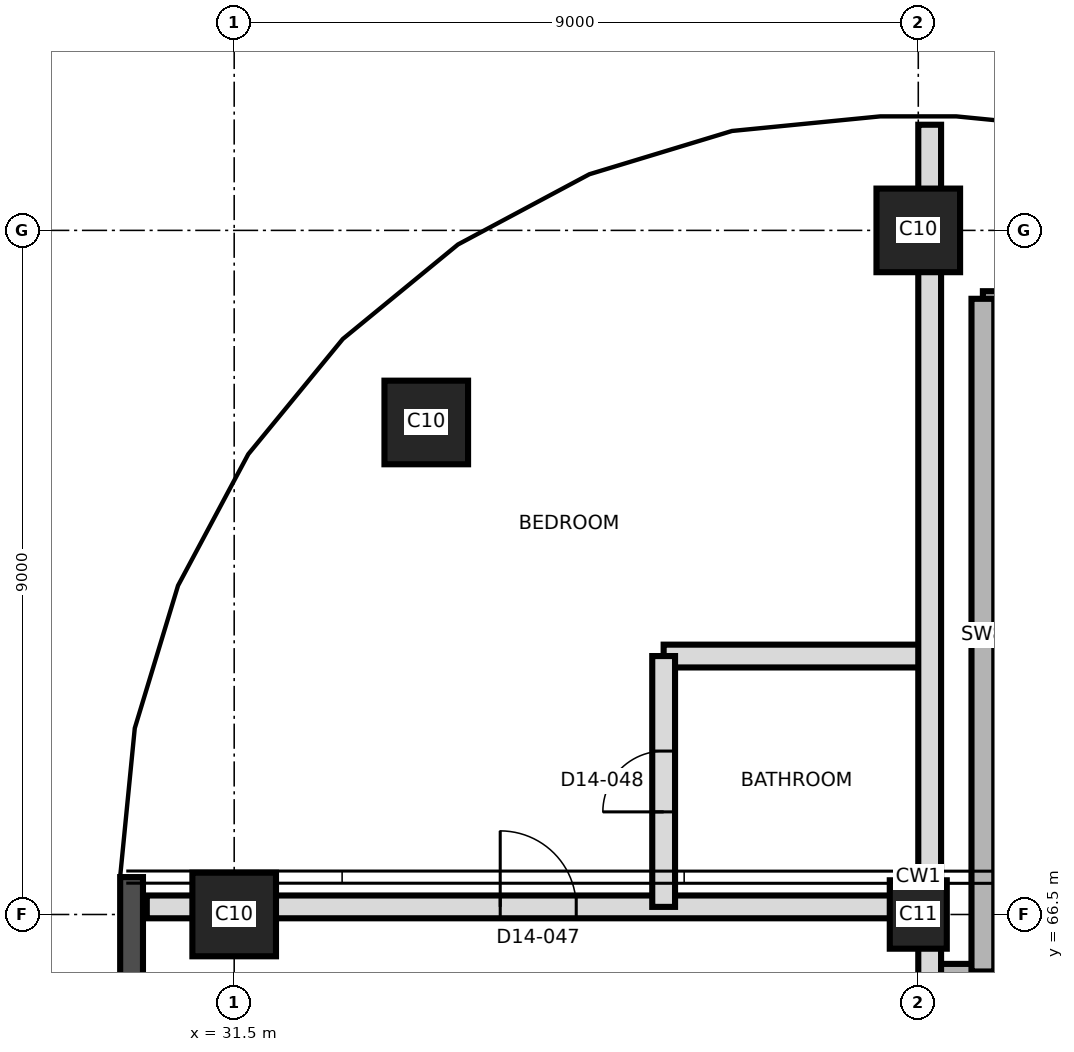
"""IFC4 building model, lengths in metres.
Left out: names, types, materials, properties, quantities, classifications, styles, units other than length and angle.
Written with IfcOpenShell. Run it as: python <this file> out.ifc"""

import sys

from ifc_helpers import new_model, si_unit, direction, frame, frame_2d, origin, origin_2d, place, context, subcontext, project, spatial, rectangle, extrude, element, fill, save


model = new_model("IFC4")
c1 = context("Model", 3, precision=1e-05, world=origin(), true_north=direction((0.0, 1.0)))
c2 = subcontext(c1, "Body", "Model", "MODEL_VIEW")
j1 = project(units=[si_unit("LENGTHUNIT", "METRE"), si_unit("PLANEANGLEUNIT", "RADIAN")], contexts=[c1])
p1 = place(None, origin())
s1 = spatial("IfcSite", under=j1, at=p1, CompositionType="ELEMENT")
p2 = place(p1, origin())
s2 = spatial("IfcBuilding", under=s1, at=p2, CompositionType="ELEMENT")
p3 = place(p2, frame((0.0, 0.0, 149.6)))
s3 = spatial("IfcBuildingStorey", under=s2, at=p3, CompositionType="ELEMENT", Elevation=149.6)
p4 = place(p3, frame((31.5, 66.5, 0.0), z_axis=(0.0, 0.0, 1.0), x_axis=(1.0, 0.0, 0.0)))
e1 = element("IfcColumn", 1, at=p4, inside=s3, PredefinedType="COLUMN", context=c2, shape_type="SweptSolid", body=[
    extrude(rectangle(XDim=1.1, YDim=1.1, at=origin_2d()), origin(), (0.0, 0.0, 1.0), 3.7),
])
p5 = place(p3, frame((40.5, 66.5, 0.0), z_axis=(0.0, 0.0, 1.0), x_axis=(0.0, 1.0, 0.0)))
e2 = element("IfcColumn", 2, at=p5, inside=s3, PredefinedType="COLUMN", context=c2, shape_type="SweptSolid", body=[
    extrude(rectangle(XDim=0.9, YDim=0.75, at=origin_2d()), origin(), (0.0, 0.0, 1.0), 3.7),
])
for number, where, z_axis, x_axis in (
    (3, (34.027, 72.973, 0.0), (0.0, 0.0, 1.0), (1.0, 0.0, 0.0)),
    (4, (40.5, 75.5, 0.0), (0.0, 0.0, 1.0), (1.0, 0.0, 0.0)),
):
    element("IfcColumn", number, at=place(p3, frame(where, z_axis=z_axis, x_axis=x_axis)), inside=s3, PredefinedType="COLUMN", context=c2, shape_type="SweptSolid", body=[
        extrude(rectangle(XDim=1.1, YDim=1.1, at=origin_2d()), origin(), (0.0, 0.0, 1.0), 3.7),
    ])
p6 = place(p3, frame((30.15, 66.992, 0.0), z_axis=(0.0, 0.0, 1.0), x_axis=(0.0, -1.0, 0.0)))
e5 = element("IfcWall", 5, at=p6, inside=s3, PredefinedType="SOLIDWALL", context=c2, shape_type="SweptSolid", body=[
    extrude(rectangle(XDim=32.968, YDim=0.3, at=frame_2d((16.484, 0.0))), origin(), (0.0, 0.0, 1.0), 3.4),
])
p7 = place(p6, frame((1.596, 0.0, 0.3)))
e6 = element("IfcOpeningElement", 6, at=p7, cuts=e5, PredefinedType="OPENING", context=c2, shape_type="SweptSolid", body=[
    extrude(rectangle(XDim=1.8, YDim=2.4, at=frame_2d((0.9, 1.2))), frame((0.0, 0.16, 0.0), z_axis=(0.0, -1.0, 0.0), x_axis=(1.0, 0.0, 0.0)), (0.0, 0.0, 1.0), 0.32),
])
p8 = place(p6, frame((5.142, 0.0, 0.9)))
e7 = element("IfcOpeningElement", 7, at=p8, cuts=e5, PredefinedType="OPENING", context=c2, shape_type="SweptSolid", body=[
    extrude(rectangle(XDim=4.2, YDim=1.5, at=frame_2d((2.1, 0.75))), frame((0.0, 0.16, 0.0), z_axis=(0.0, -1.0, 0.0), x_axis=(1.0, 0.0, 0.0)), (0.0, 0.0, 1.0), 0.32),
])
p9 = place(p6, frame((9.642, 0.0, 0.9)))
e8 = element("IfcOpeningElement", 8, at=p9, cuts=e5, PredefinedType="OPENING", context=c2, shape_type="SweptSolid", body=[
    extrude(rectangle(XDim=4.2, YDim=1.5, at=frame_2d((2.1, 0.75))), frame((0.0, 0.16, 0.0), z_axis=(0.0, -1.0, 0.0), x_axis=(1.0, 0.0, 0.0)), (0.0, 0.0, 1.0), 0.32),
])
p10 = place(p6, frame((14.142, 0.0, 0.9)))
e9 = element("IfcOpeningElement", 9, at=p10, cuts=e5, PredefinedType="OPENING", context=c2, shape_type="SweptSolid", body=[
    extrude(rectangle(XDim=4.2, YDim=1.5, at=frame_2d((2.1, 0.75))), frame((0.0, 0.16, 0.0), z_axis=(0.0, -1.0, 0.0), x_axis=(1.0, 0.0, 0.0)), (0.0, 0.0, 1.0), 0.32),
])
p11 = place(p6, frame((18.642, 0.0, 0.9)))
e10 = element("IfcOpeningElement", 10, at=p11, cuts=e5, PredefinedType="OPENING", context=c2, shape_type="SweptSolid", body=[
    extrude(rectangle(XDim=4.2, YDim=1.5, at=frame_2d((2.1, 0.75))), frame((0.0, 0.16, 0.0), z_axis=(0.0, -1.0, 0.0), x_axis=(1.0, 0.0, 0.0)), (0.0, 0.0, 1.0), 0.32),
])
p12 = place(p6, frame((23.142, 0.0, 0.9)))
e11 = element("IfcOpeningElement", 11, at=p12, cuts=e5, PredefinedType="OPENING", context=c2, shape_type="SweptSolid", body=[
    extrude(rectangle(XDim=4.2, YDim=1.5, at=frame_2d((2.1, 0.75))), frame((0.0, 0.16, 0.0), z_axis=(0.0, -1.0, 0.0), x_axis=(1.0, 0.0, 0.0)), (0.0, 0.0, 1.0), 0.32),
])
p13 = place(p6, frame((29.33, 0.0, 0.3)))
e12 = element("IfcOpeningElement", 12, at=p13, cuts=e5, PredefinedType="OPENING", context=c2, shape_type="SweptSolid", body=[
    extrude(rectangle(XDim=1.8, YDim=2.4, at=frame_2d((0.9, 1.2))), frame((0.0, 0.16, 0.0), z_axis=(0.0, -1.0, 0.0), x_axis=(1.0, 0.0, 0.0)), (0.0, 0.0, 1.0), 0.32),
])
p14 = place(p3, frame((40.65, 65.7, 0.0), z_axis=(0.0, 0.0, 1.0), x_axis=(1.0, 0.0, 0.0)))
e13 = element("IfcWall", 13, at=p14, inside=s3, PredefinedType="SHEAR", context=c2, shape_type="SweptSolid", body=[
    extrude(rectangle(XDim=6.2, YDim=0.3, at=frame_2d((3.1, 0.0))), origin(), (0.0, 0.0, 1.0), 3.4),
])
p15 = place(p14, frame((1.1, 0.0, 0.0)))
e14 = element("IfcOpeningElement", 14, at=p15, cuts=e13, PredefinedType="OPENING", context=c2, shape_type="SweptSolid", body=[
    extrude(rectangle(XDim=1.2, YDim=2.1, at=frame_2d((0.6, 1.05))), frame((0.0, 0.16, 0.0), z_axis=(0.0, -1.0, 0.0), x_axis=(1.0, 0.0, 0.0)), (0.0, 0.0, 1.0), 0.32),
])
p16 = place(p3, frame((30.35, 66.6, 0.0), z_axis=(0.0, 0.0, 1.0), x_axis=(1.0, 0.0, 0.0)))
e15 = element("IfcWall", 15, at=p16, inside=s3, PredefinedType="PARTITIONING", context=c2, shape_type="SweptSolid", body=[
    extrude(rectangle(XDim=10.3, YDim=0.3, at=frame_2d((5.15, 0.0))), origin(), (0.0, 0.0, 1.0), 3.35),
])
p17 = place(p16, frame((4.65, 0.0, 0.0)))
e16 = element("IfcOpeningElement", 16, at=p17, cuts=e15, PredefinedType="OPENING", context=c2, shape_type="SweptSolid", body=[
    extrude(rectangle(XDim=1.0, YDim=2.1, at=frame_2d((0.5, 1.05))), frame((0.0, 0.16, 0.0), z_axis=(0.0, -1.0, 0.0), x_axis=(1.0, 0.0, 0.0)), (0.0, 0.0, 1.0), 0.32),
])
p18 = place(p3, frame((37.15, 69.9, 0.0), z_axis=(0.0, 0.0, 1.0), x_axis=(1.0, 0.0, 0.0)))
e17 = element("IfcWall", 17, at=p18, inside=s3, PredefinedType="PARTITIONING", context=c2, shape_type="SweptSolid", body=[
    extrude(rectangle(XDim=3.5, YDim=0.3, at=frame_2d((1.75, 0.0))), origin(), (0.0, 0.0, 1.0), 3.4),
])
p19 = place(p3, frame((41.35, 74.55, 0.0), z_axis=(0.0, 0.0, 1.0), x_axis=(1.0, 0.0, 0.0)))
e18 = element("IfcWall", 18, at=p19, inside=s3, PredefinedType="SHEAR", context=c2, shape_type="SweptSolid", body=[
    extrude(rectangle(XDim=3.0, YDim=0.3, at=frame_2d((1.5, 0.0))), origin(), (0.0, 0.0, 1.0), 3.4),
])
p20 = place(p3, frame((37.15, 66.6, 0.0), z_axis=(0.0, 0.0, 1.0), x_axis=(0.0, 1.0, 0.0)))
e19 = element("IfcWall", 19, at=p20, inside=s3, PredefinedType="PARTITIONING", context=c2, shape_type="SweptSolid", body=[
    extrude(rectangle(XDim=3.3, YDim=0.3, at=frame_2d((1.65, 0.0))), origin(), (0.0, 0.0, 1.0), 3.4),
])
p21 = place(p20, frame((1.25, 0.0, 0.0)))
e20 = element("IfcOpeningElement", 20, at=p21, cuts=e19, PredefinedType="OPENING", context=c2, shape_type="SweptSolid", body=[
    extrude(rectangle(XDim=0.8, YDim=2.1, at=frame_2d((0.4, 1.05))), frame((0.0, 0.16, 0.0), z_axis=(0.0, -1.0, 0.0), x_axis=(1.0, 0.0, 0.0)), (0.0, 0.0, 1.0), 0.32),
])
p22 = place(p3, frame((40.65, 39.65, 0.0), z_axis=(0.0, 0.0, 1.0), x_axis=(0.0, 1.0, 0.0)))
e21 = element("IfcWall", 21, at=p22, inside=s3, PredefinedType="PARTITIONING", context=c2, shape_type="SweptSolid", body=[
    extrude(rectangle(XDim=37.24, YDim=0.3, at=frame_2d((18.62, 0.0))), origin(), (0.0, 0.0, 1.0), 3.35),
])
p23 = place(p22, frame((2.2, 0.0, 0.0)))
e22 = element("IfcOpeningElement", 22, at=p23, cuts=e21, PredefinedType="OPENING", context=c2, shape_type="SweptSolid", body=[
    extrude(rectangle(XDim=1.0, YDim=2.4, at=frame_2d((0.5, 1.2))), frame((0.0, 0.16, 0.0), z_axis=(0.0, -1.0, 0.0), x_axis=(1.0, 0.0, 0.0)), (0.0, 0.0, 1.0), 0.32),
])
p24 = place(p22, frame((9.985, 0.0, 0.0)))
e23 = element("IfcOpeningElement", 23, at=p24, cuts=e21, PredefinedType="OPENING", context=c2, shape_type="SweptSolid", body=[
    extrude(rectangle(XDim=1.2, YDim=2.1, at=frame_2d((0.6, 1.05))), frame((0.0, 0.16, 0.0), z_axis=(0.0, -1.0, 0.0), x_axis=(1.0, 0.0, 0.0)), (0.0, 0.0, 1.0), 0.32),
])
p25 = place(p22, frame((13.235, 0.0, 0.0)))
e24 = element("IfcOpeningElement", 24, at=p25, cuts=e21, PredefinedType="OPENING", context=c2, shape_type="SweptSolid", body=[
    extrude(rectangle(XDim=1.0, YDim=2.1, at=frame_2d((0.5, 1.05))), frame((0.0, 0.16, 0.0), z_axis=(0.0, -1.0, 0.0), x_axis=(1.0, 0.0, 0.0)), (0.0, 0.0, 1.0), 0.32),
])
p26 = place(p22, frame((21.35, 0.0, 0.0)))
e25 = element("IfcOpeningElement", 25, at=p26, cuts=e21, PredefinedType="OPENING", context=c2, shape_type="SweptSolid", body=[
    extrude(rectangle(XDim=1.0, YDim=2.4, at=frame_2d((0.5, 1.2))), frame((0.0, 0.16, 0.0), z_axis=(0.0, -1.0, 0.0), x_axis=(1.0, 0.0, 0.0)), (0.0, 0.0, 1.0), 0.32),
])
p27 = place(p3, frame((41.35, 65.75, 0.0), z_axis=(0.0, 0.0, 1.0), x_axis=(0.0, 1.0, 0.0)))
e26 = element("IfcWall", 26, at=p27, inside=s3, PredefinedType="SHEAR", context=c2, shape_type="SweptSolid", body=[
    extrude(rectangle(XDim=8.85, YDim=0.3, at=frame_2d((4.425, 0.0))), origin(), (0.0, 0.0, 1.0), 3.4),
])
p28 = place(p17, origin())
e27 = element("IfcDoor", 27, at=p28, inside=s3, OperationType="SINGLE_SWING_LEFT", PredefinedType="DOOR", context=c2, shape_type="SweptSolid", body=[
    extrude(rectangle(XDim=1.0, YDim=2.1, at=frame_2d((0.5, 1.05))), frame((0.0, 0.025, 0.0), z_axis=(0.0, -1.0, 0.0), x_axis=(1.0, 0.0, 0.0)), (0.0, 0.0, 1.0), 0.05),
])
fill(e16, e27)
p29 = place(p21, origin())
e28 = element("IfcDoor", 28, at=p29, inside=s3, OperationType="SINGLE_SWING_LEFT", PredefinedType="DOOR", context=c2, shape_type="SweptSolid", body=[
    extrude(rectangle(XDim=0.8, YDim=2.1, at=frame_2d((0.4, 1.05))), frame((0.0, 0.025, 0.0), z_axis=(0.0, -1.0, 0.0), x_axis=(1.0, 0.0, 0.0)), (0.0, 0.0, 1.0), 0.05),
])
fill(e20, e28)
save(model, sys.argv[1])
